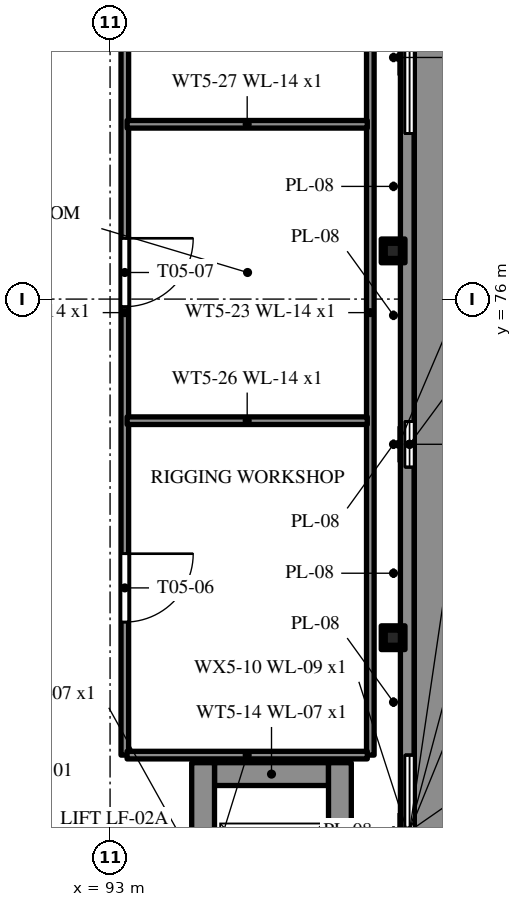
"""IFC4 building model, lengths in metres.
Left out: names, types, materials, properties, quantities, classifications, styles, units other than length and angle.
Written with IfcOpenShell. Run it as: python <this file> out.ifc"""

import sys

from ifc_helpers import new_model, si_unit, direction, frame, frame_2d, origin, origin_2d, place, context, subcontext, project, spatial, polyline, rectangle, hollow_rectangle, i_section, outline, extrude, element, fill, save


model = new_model("IFC4")
c1 = context("Model", 3, precision=1e-05, world=origin(), true_north=direction((0.0, 1.0)))
c2 = subcontext(c1, "Body", "Model", "MODEL_VIEW")
j1 = project(units=[si_unit("LENGTHUNIT", "METRE"), si_unit("PLANEANGLEUNIT", "RADIAN")], contexts=[c1])
p1 = place(None, origin())
s1 = spatial("IfcSite", under=j1, at=p1, CompositionType="ELEMENT")
p2 = place(p1, origin())
s2 = spatial("IfcBuilding", under=s1, at=p2, CompositionType="ELEMENT")
p3 = place(p2, frame((0.0, 0.0, 24.0)))
s3 = spatial("IfcBuildingStorey", under=s2, at=p3, CompositionType="ELEMENT", Elevation=24.0)
p4 = place(p3, frame((97.225, 55.4, 0.0), z_axis=(0.0, 0.0, 1.0), x_axis=(0.0, 1.0, 0.0)))
e1 = element("IfcWall", 1, at=p4, inside=s3, PredefinedType="SOLIDWALL", context=c2, shape_type="SweptSolid", body=[
    extrude(outline(polyline([(0.0, 0.0), (27.05, 0.0), (27.05, 0.5), (25.75, 0.5), (25.664, 0.5), (25.578, 0.5), (22.978, 0.5), (22.899, 0.5), (20.704, 0.5), (20.509, 0.5), (18.742, 0.5), (18.677, 0.5), (17.018, 0.5), (16.956, 0.5), (16.894, 0.5), (13.935, 0.5), (13.871, 0.5), (13.807, 0.5), (11.958, 0.5), (11.896, 0.5), (10.181, 0.5), (10.025, 0.5), (8.455, 0.5), (8.397, 0.5), (6.845, 0.5), (6.789, 0.5), (6.732, 0.5), (3.004, 0.5), (2.947, 0.5), (2.89, 0.5), (1.288, 0.5), (1.232, 0.5), (0.0, 0.5), (0.0, 0.0)])), frame((0.0, 0.225, 0.0), z_axis=(0.0, -1.0, 0.0), x_axis=(1.0, 0.0, 0.0)), (0.0, 0.0, 1.0), 0.45),
])
for number, where, z_axis, x_axis in (
    (2, (96.724, 71.545, 0.0), (0.0, 0.0, 1.0), (1.0, 0.0, 0.0)),
    (3, (96.724, 76.635, 0.0), (0.0, 0.0, 1.0), (1.0, 0.0, 0.0)),
):
    element("IfcColumn", number, at=place(p3, frame(where, z_axis=z_axis, x_axis=x_axis)), inside=s3, PredefinedType="COLUMN", context=c2, shape_type="SweptSolid", body=[
        extrude(i_section(OverallWidth=0.312, OverallDepth=0.312, WebThickness=0.017, FlangeThickness=0.017, FilletRadius=0.016, at=origin_2d()), origin(), (0.0, 0.0, 1.0), 12.21),
    ])
p5 = place(p3, frame((95.874, 69.75, 0.0), z_axis=(0.0, 0.0, 1.0), x_axis=(-1.0, 0.0, 0.0)))
e4 = element("IfcWall", 4, at=p5, inside=s3, PredefinedType="SHEAR", context=c2, shape_type="SweptSolid", body=[
    extrude(rectangle(XDim=1.5, YDim=0.3, at=frame_2d((0.75, 0.0))), origin(), (0.0, 0.0, 1.0), 4.2),
])
p6 = place(p3, frame((94.224, 66.9, 0.0), z_axis=(0.0, 0.0, 1.0), x_axis=(0.0, 1.0, 0.0)))
e5 = element("IfcWall", 5, at=p6, inside=s3, PredefinedType="SHEAR", context=c2, shape_type="SweptSolid", body=[
    extrude(rectangle(XDim=3.0, YDim=0.3, at=frame_2d((1.5, 0.0))), origin(), (0.0, 0.0, 1.0), 4.2),
])
p7 = place(p6, frame((0.9, 0.0, 0.0)))
e6 = element("IfcOpeningElement", 6, at=p7, cuts=e5, PredefinedType="OPENING", context=c2, shape_type="SweptSolid", body=[
    extrude(rectangle(XDim=1.2, YDim=2.2, at=frame_2d((0.6, 1.1))), frame((0.0, 0.16, 0.0), z_axis=(0.0, -1.0, 0.0), x_axis=(1.0, 0.0, 0.0)), (0.0, 0.0, 1.0), 0.32),
])
p8 = place(p3, frame((96.024, 66.9, 0.0), z_axis=(0.0, 0.0, 1.0), x_axis=(0.0, 1.0, 0.0)))
e7 = element("IfcWall", 7, at=p8, inside=s3, PredefinedType="SHEAR", context=c2, shape_type="SweptSolid", body=[
    extrude(rectangle(XDim=3.0, YDim=0.3, at=frame_2d((1.5, 0.0))), origin(), (0.0, 0.0, 1.0), 4.2),
])
p9 = place(p3, frame((96.424, 70.0, 0.0), z_axis=(0.0, 0.0, 1.0), x_axis=(0.0, 1.0, 0.0)))
e8 = element("IfcWall", 8, at=p9, inside=s3, PredefinedType="PARTITIONING", context=c2, shape_type="SweptSolid", body=[
    extrude(rectangle(XDim=11.644, YDim=0.1, at=frame_2d((5.822, 0.0))), origin(), (0.0, 0.0, 1.0), 3.2),
])
p10 = place(p3, frame((93.194, 70.0, 0.0), z_axis=(0.0, 0.0, 1.0), x_axis=(0.0, 1.0, 0.0)))
e9 = element("IfcWall", 9, at=p10, inside=s3, PredefinedType="PARTITIONING", context=c2, shape_type="SweptSolid", body=[
    extrude(rectangle(XDim=11.644, YDim=0.1, at=frame_2d((5.822, 0.0))), origin(), (0.0, 0.0, 1.0), 3.2),
])
p11 = place(p10, frame((1.75, 0.0, 0.0)))
e10 = element("IfcOpeningElement", 10, at=p11, cuts=e9, PredefinedType="OPENING", context=c2, shape_type="SweptSolid", body=[
    extrude(rectangle(XDim=0.9, YDim=2.1, at=frame_2d((0.45, 1.05))), frame((0.0, 0.06, 0.0), z_axis=(0.0, -1.0, 0.0), x_axis=(1.0, 0.0, 0.0)), (0.0, 0.0, 1.0), 0.12),
])
p12 = place(p10, frame((5.9, 0.0, 0.0)))
e11 = element("IfcOpeningElement", 11, at=p12, cuts=e9, PredefinedType="OPENING", context=c2, shape_type="SweptSolid", body=[
    extrude(rectangle(XDim=0.9, YDim=2.1, at=frame_2d((0.45, 1.05))), frame((0.0, 0.06, 0.0), z_axis=(0.0, -1.0, 0.0), x_axis=(1.0, 0.0, 0.0)), (0.0, 0.0, 1.0), 0.12),
])
p13 = place(p10, frame((9.522, 0.0, 0.0)))
e12 = element("IfcOpeningElement", 12, at=p13, cuts=e9, PredefinedType="OPENING", context=c2, shape_type="SweptSolid", body=[
    extrude(rectangle(XDim=0.9, YDim=2.1, at=frame_2d((0.45, 1.05))), frame((0.0, 0.06, 0.0), z_axis=(0.0, -1.0, 0.0), x_axis=(1.0, 0.0, 0.0)), (0.0, 0.0, 1.0), 0.12),
])
for number, where, z_axis, x_axis in (
    (13, (96.384, 70.0, 0.0), (0.0, 0.0, 1.0), (-1.0, 0.0, 0.0)),
    (14, (96.384, 74.4, 0.0), (0.0, 0.0, 1.0), (-1.0, 0.0, 0.0)),
    (15, (96.384, 78.3, 0.0), (0.0, 0.0, 1.0), (-1.0, 0.0, 0.0)),
):
    element("IfcWall", number, at=place(p3, frame(where, z_axis=z_axis, x_axis=x_axis)), inside=s3, PredefinedType="PARTITIONING", context=c2, shape_type="SweptSolid", body=[
        extrude(rectangle(XDim=3.16, YDim=0.1, at=frame_2d((1.58, 0.0))), origin(), (0.0, 0.0, 1.0), 3.2),
    ])
p14 = place(p3, frame((96.94, 56.12, 0.0), z_axis=(0.0, 0.0, 1.0), x_axis=(0.0, 1.0, 0.0)))
e16 = element("IfcWall", 16, at=p14, inside=s3, PredefinedType="STANDARD", context=c2, shape_type="SweptSolid", body=[
    extrude(rectangle(XDim=25.76, YDim=0.12, at=frame_2d((12.88, 0.0))), origin(), (0.0, 0.0, 1.0), 4.0),
])
p15 = place(p14, frame((1.701, 0.0, 1.4)))
e17 = element("IfcOpeningElement", 17, at=p15, cuts=e16, PredefinedType="OPENING", context=c2, shape_type="SweptSolid", body=[
    extrude(rectangle(XDim=2.0, YDim=1.2, at=frame_2d((1.0, 0.6))), frame((0.0, 0.07, 0.0), z_axis=(0.0, -1.0, 0.0), x_axis=(1.0, 0.0, 0.0)), (0.0, 0.0, 1.0), 0.14),
])
p16 = place(p14, frame((11.88, 0.0, 1.4)))
e18 = element("IfcOpeningElement", 18, at=p16, cuts=e16, PredefinedType="OPENING", context=c2, shape_type="SweptSolid", body=[
    extrude(rectangle(XDim=2.0, YDim=1.2, at=frame_2d((1.0, 0.6))), frame((0.0, 0.07, 0.0), z_axis=(0.0, -1.0, 0.0), x_axis=(1.0, 0.0, 0.0)), (0.0, 0.0, 1.0), 0.14),
])
p17 = place(p14, frame((22.059, 0.0, 1.4)))
e19 = element("IfcOpeningElement", 19, at=p17, cuts=e16, PredefinedType="OPENING", context=c2, shape_type="SweptSolid", body=[
    extrude(rectangle(XDim=2.0, YDim=1.2, at=frame_2d((1.0, 0.6))), frame((0.0, 0.07, 0.0), z_axis=(0.0, -1.0, 0.0), x_axis=(1.0, 0.0, 0.0)), (0.0, 0.0, 1.0), 0.14),
])
p18 = place(p14, frame((7.49, 0.0, 0.5)))
e20 = element("IfcOpeningElement", 20, at=p18, cuts=e16, PredefinedType="OPENING", context=c2, shape_type="SweptSolid", body=[
    extrude(rectangle(XDim=0.6, YDim=2.1, at=frame_2d((0.3, 1.05))), frame((0.0, 0.07, 0.0), z_axis=(0.0, -1.0, 0.0), x_axis=(1.0, 0.0, 0.0)), (0.0, 0.0, 1.0), 0.14),
])
p19 = place(p14, frame((17.67, 0.0, 0.5)))
e21 = element("IfcOpeningElement", 21, at=p19, cuts=e16, PredefinedType="OPENING", context=c2, shape_type="SweptSolid", body=[
    extrude(rectangle(XDim=0.6, YDim=2.1, at=frame_2d((0.3, 1.05))), frame((0.0, 0.07, 0.0), z_axis=(0.0, -1.0, 0.0), x_axis=(1.0, 0.0, 0.0)), (0.0, 0.0, 1.0), 0.14),
])
p20 = place(p3, frame((96.94, 56.12, 4.0), z_axis=(0.0, 0.0, 1.0), x_axis=(0.0, 1.0, 0.0)))
e22 = element("IfcWall", 22, at=p20, inside=s3, PredefinedType="STANDARD", context=c2, shape_type="SweptSolid", body=[
    extrude(rectangle(XDim=25.76, YDim=0.12, at=frame_2d((12.88, 0.0))), origin(), (0.0, 0.0, 1.0), 8.5),
])
p21 = place(p20, frame((1.701, 0.0, 2.4)))
e23 = element("IfcOpeningElement", 23, at=p21, cuts=e22, PredefinedType="OPENING", context=c2, shape_type="SweptSolid", body=[
    extrude(rectangle(XDim=2.0, YDim=1.2, at=frame_2d((1.0, 0.6))), frame((0.0, 0.07, 0.0), z_axis=(0.0, -1.0, 0.0), x_axis=(1.0, 0.0, 0.0)), (0.0, 0.0, 1.0), 0.14),
])
p22 = place(p20, frame((1.701, 0.0, 5.6)))
e24 = element("IfcOpeningElement", 24, at=p22, cuts=e22, PredefinedType="OPENING", context=c2, shape_type="SweptSolid", body=[
    extrude(rectangle(XDim=2.0, YDim=1.2, at=frame_2d((1.0, 0.6))), frame((0.0, 0.07, 0.0), z_axis=(0.0, -1.0, 0.0), x_axis=(1.0, 0.0, 0.0)), (0.0, 0.0, 1.0), 0.14),
])
p23 = place(p20, frame((11.88, 0.0, 2.4)))
e25 = element("IfcOpeningElement", 25, at=p23, cuts=e22, PredefinedType="OPENING", context=c2, shape_type="SweptSolid", body=[
    extrude(rectangle(XDim=2.0, YDim=1.2, at=frame_2d((1.0, 0.6))), frame((0.0, 0.07, 0.0), z_axis=(0.0, -1.0, 0.0), x_axis=(1.0, 0.0, 0.0)), (0.0, 0.0, 1.0), 0.14),
])
p24 = place(p20, frame((11.88, 0.0, 5.6)))
e26 = element("IfcOpeningElement", 26, at=p24, cuts=e22, PredefinedType="OPENING", context=c2, shape_type="SweptSolid", body=[
    extrude(rectangle(XDim=2.0, YDim=1.2, at=frame_2d((1.0, 0.6))), frame((0.0, 0.07, 0.0), z_axis=(0.0, -1.0, 0.0), x_axis=(1.0, 0.0, 0.0)), (0.0, 0.0, 1.0), 0.14),
])
p25 = place(p20, frame((22.059, 0.0, 2.4)))
e27 = element("IfcOpeningElement", 27, at=p25, cuts=e22, PredefinedType="OPENING", context=c2, shape_type="SweptSolid", body=[
    extrude(rectangle(XDim=2.0, YDim=1.2, at=frame_2d((1.0, 0.6))), frame((0.0, 0.07, 0.0), z_axis=(0.0, -1.0, 0.0), x_axis=(1.0, 0.0, 0.0)), (0.0, 0.0, 1.0), 0.14),
])
p26 = place(p20, frame((22.059, 0.0, 5.6)))
e28 = element("IfcOpeningElement", 28, at=p26, cuts=e22, PredefinedType="OPENING", context=c2, shape_type="SweptSolid", body=[
    extrude(rectangle(XDim=2.0, YDim=1.2, at=frame_2d((1.0, 0.6))), frame((0.0, 0.07, 0.0), z_axis=(0.0, -1.0, 0.0), x_axis=(1.0, 0.0, 0.0)), (0.0, 0.0, 1.0), 0.14),
])
p27 = place(p20, frame((7.49, 0.0, 1.5)))
e29 = element("IfcOpeningElement", 29, at=p27, cuts=e22, PredefinedType="OPENING", context=c2, shape_type="SweptSolid", body=[
    extrude(rectangle(XDim=0.6, YDim=2.1, at=frame_2d((0.3, 1.05))), frame((0.0, 0.07, 0.0), z_axis=(0.0, -1.0, 0.0), x_axis=(1.0, 0.0, 0.0)), (0.0, 0.0, 1.0), 0.14),
])
p28 = place(p20, frame((17.67, 0.0, 1.5)))
e30 = element("IfcOpeningElement", 30, at=p28, cuts=e22, PredefinedType="OPENING", context=c2, shape_type="SweptSolid", body=[
    extrude(rectangle(XDim=0.6, YDim=2.1, at=frame_2d((0.3, 1.05))), frame((0.0, 0.07, 0.0), z_axis=(0.0, -1.0, 0.0), x_axis=(1.0, 0.0, 0.0)), (0.0, 0.0, 1.0), 0.14),
])
p29 = place(p3, frame((96.91, 56.0, 12.5), z_axis=(0.0, 0.0, 1.0), x_axis=(0.0, 1.0, 0.0)))
e31 = element("IfcWall", 31, at=p29, inside=s3, PredefinedType="PARAPET", context=c2, shape_type="SweptSolid", body=[
    extrude(rectangle(XDim=26.0, YDim=0.18, at=frame_2d((13.0, 0.0))), origin(), (0.0, 0.0, 1.0), 1.1),
])
for number, where, z_axis, x_axis in (
    (32, (96.72, 71.545, 12.21), (0.0, 0.0, 1.0), (1.0, 0.0, 0.0)),
    (33, (96.72, 76.635, 12.21), (0.0, 0.0, 1.0), (1.0, 0.0, 0.0)),
):
    element("IfcColumn", number, at=place(p3, frame(where, z_axis=z_axis, x_axis=x_axis)), inside=s3, PredefinedType="COLUMN", context=c2, shape_type="SweptSolid", body=[
        extrude(hollow_rectangle(XDim=0.2, YDim=0.2, WallThickness=0.01, InnerFilletRadius=0.01, OuterFilletRadius=0.02, at=origin_2d()), origin(), (0.0, 0.0, 1.0), 1.39),
    ])
p30 = place(p11, frame((0.9, 0.0, 0.0), z_axis=(0.0, 0.0, 1.0), x_axis=(-1.0, 0.0, 0.0)))
e34 = element("IfcDoor", 34, at=p30, inside=s3, OperationType="SINGLE_SWING_LEFT", PredefinedType="DOOR", context=c2, shape_type="SweptSolid", body=[
    extrude(rectangle(XDim=0.9, YDim=2.1, at=frame_2d((0.45, 1.05))), frame((0.0, 0.025, 0.0), z_axis=(0.0, -1.0, 0.0), x_axis=(1.0, 0.0, 0.0)), (0.0, 0.0, 1.0), 0.05),
])
fill(e10, e34)
p31 = place(p12, frame((0.9, 0.0, 0.0), z_axis=(0.0, 0.0, 1.0), x_axis=(-1.0, 0.0, 0.0)))
e35 = element("IfcDoor", 35, at=p31, inside=s3, OperationType="SINGLE_SWING_LEFT", PredefinedType="DOOR", context=c2, shape_type="SweptSolid", body=[
    extrude(rectangle(XDim=0.9, YDim=2.1, at=frame_2d((0.45, 1.05))), frame((0.0, 0.025, 0.0), z_axis=(0.0, -1.0, 0.0), x_axis=(1.0, 0.0, 0.0)), (0.0, 0.0, 1.0), 0.05),
])
fill(e11, e35)
p32 = place(p16, origin())
e36 = element("IfcWindow", 36, at=p32, inside=s3, PartitioningType="SINGLE_PANEL", PredefinedType="WINDOW", context=c2, shape_type="SweptSolid", body=[
    extrude(rectangle(XDim=2.0, YDim=1.2, at=frame_2d((1.0, 0.6))), frame((0.0, 0.03, 0.0), z_axis=(0.0, -1.0, 0.0), x_axis=(1.0, 0.0, 0.0)), (0.0, 0.0, 1.0), 0.06),
])
fill(e18, e36)
p33 = place(p23, origin())
e37 = element("IfcWindow", 37, at=p33, inside=s3, PartitioningType="SINGLE_PANEL", PredefinedType="WINDOW", context=c2, shape_type="SweptSolid", body=[
    extrude(rectangle(XDim=2.0, YDim=1.2, at=frame_2d((1.0, 0.6))), frame((0.0, 0.03, 0.0), z_axis=(0.0, -1.0, 0.0), x_axis=(1.0, 0.0, 0.0)), (0.0, 0.0, 1.0), 0.06),
])
fill(e25, e37)
p34 = place(p24, origin())
e38 = element("IfcWindow", 38, at=p34, inside=s3, PartitioningType="SINGLE_PANEL", PredefinedType="WINDOW", context=c2, shape_type="SweptSolid", body=[
    extrude(rectangle(XDim=2.0, YDim=1.2, at=frame_2d((1.0, 0.6))), frame((0.0, 0.03, 0.0), z_axis=(0.0, -1.0, 0.0), x_axis=(1.0, 0.0, 0.0)), (0.0, 0.0, 1.0), 0.06),
])
fill(e26, e38)
p35 = place(p17, origin())
e39 = element("IfcWindow", 39, at=p35, inside=s3, PartitioningType="SINGLE_PANEL", PredefinedType="WINDOW", context=c2, shape_type="SweptSolid", body=[
    extrude(rectangle(XDim=2.0, YDim=1.2, at=frame_2d((1.0, 0.6))), frame((0.0, 0.03, 0.0), z_axis=(0.0, -1.0, 0.0), x_axis=(1.0, 0.0, 0.0)), (0.0, 0.0, 1.0), 0.06),
])
fill(e19, e39)
p36 = place(p25, origin())
e40 = element("IfcWindow", 40, at=p36, inside=s3, PartitioningType="SINGLE_PANEL", PredefinedType="WINDOW", context=c2, shape_type="SweptSolid", body=[
    extrude(rectangle(XDim=2.0, YDim=1.2, at=frame_2d((1.0, 0.6))), frame((0.0, 0.03, 0.0), z_axis=(0.0, -1.0, 0.0), x_axis=(1.0, 0.0, 0.0)), (0.0, 0.0, 1.0), 0.06),
])
fill(e27, e40)
p37 = place(p26, origin())
e41 = element("IfcWindow", 41, at=p37, inside=s3, PartitioningType="SINGLE_PANEL", PredefinedType="WINDOW", context=c2, shape_type="SweptSolid", body=[
    extrude(rectangle(XDim=2.0, YDim=1.2, at=frame_2d((1.0, 0.6))), frame((0.0, 0.03, 0.0), z_axis=(0.0, -1.0, 0.0), x_axis=(1.0, 0.0, 0.0)), (0.0, 0.0, 1.0), 0.06),
])
fill(e28, e41)
p38 = place(p19, origin())
e42 = element("IfcWindow", 42, at=p38, inside=s3, PartitioningType="SINGLE_PANEL", PredefinedType="WINDOW", context=c2, shape_type="SweptSolid", body=[
    extrude(rectangle(XDim=0.6, YDim=2.1, at=frame_2d((0.3, 1.05))), frame((0.0, 0.03, 0.0), z_axis=(0.0, -1.0, 0.0), x_axis=(1.0, 0.0, 0.0)), (0.0, 0.0, 1.0), 0.06),
])
fill(e21, e42)
p39 = place(p28, origin())
e43 = element("IfcWindow", 43, at=p39, inside=s3, PartitioningType="SINGLE_PANEL", PredefinedType="WINDOW", context=c2, shape_type="SweptSolid", body=[
    extrude(rectangle(XDim=0.6, YDim=2.1, at=frame_2d((0.3, 1.05))), frame((0.0, 0.03, 0.0), z_axis=(0.0, -1.0, 0.0), x_axis=(1.0, 0.0, 0.0)), (0.0, 0.0, 1.0), 0.06),
])
fill(e30, e43)
save(model, sys.argv[1])
